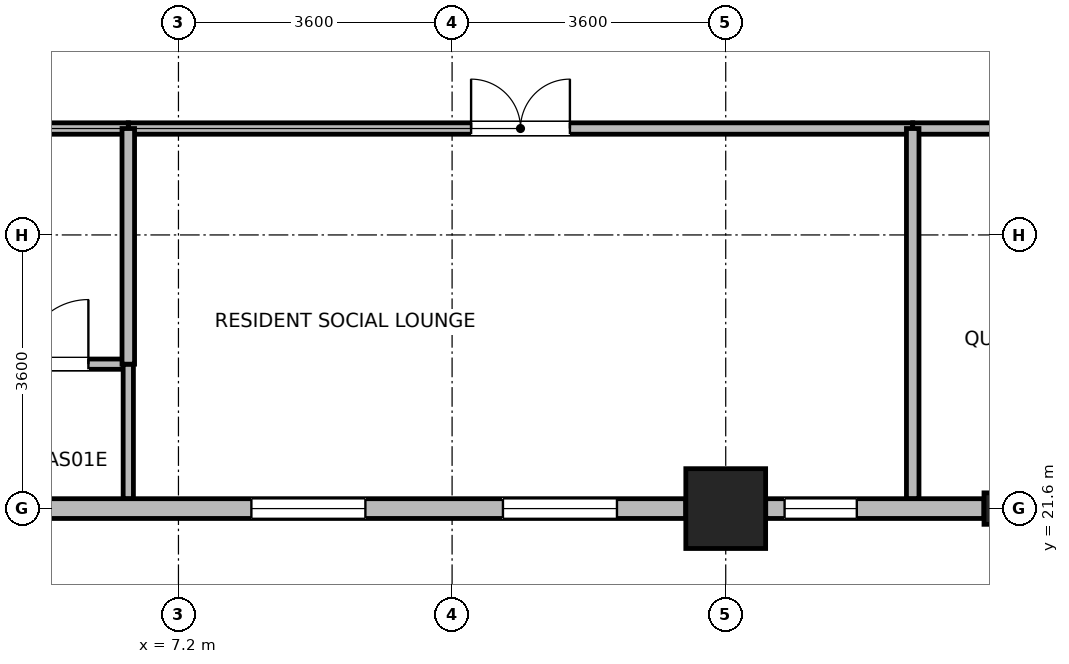
"""IFC4 building model, lengths in metres.
Left out: names, types, materials, properties, quantities, classifications, styles, units other than length and angle.
Written with IfcOpenShell. Run it as: python <this file> out.ifc"""

import sys

from ifc_helpers import new_model, si_unit, direction, frame, frame_2d, origin, origin_2d, place, context, subcontext, project, spatial, rectangle, i_section, extrude, source, transform, mapped, element, fill, save


model = new_model("IFC4")
c1 = context("Model", 3, precision=1e-05, world=origin(), true_north=direction((0.0, 1.0)))
c2 = subcontext(c1, "Body", "Model", "MODEL_VIEW")
j1 = project(units=[si_unit("LENGTHUNIT", "METRE"), si_unit("PLANEANGLEUNIT", "RADIAN")], contexts=[c1])
p1 = place(None, origin())
s1 = spatial("IfcSite", under=j1, at=p1, CompositionType="ELEMENT")
p2 = place(p1, origin())
s2 = spatial("IfcBuilding", under=s1, at=p2, CompositionType="ELEMENT")
p3 = place(p2, frame((0.0, 0.0, 177.2)))
s3 = spatial("IfcBuildingStorey", under=s2, at=p3, CompositionType="ELEMENT", Elevation=177.2)
m1 = source(origin(), c2, "Body", "SweptSolid", [
    extrude(rectangle(XDim=1.05, YDim=1.05, at=origin_2d()), origin(), (0.0, 0.0, 1.0), 3.7),
])
p4 = place(p3, frame((14.4, 21.6, 0.0), z_axis=(0.0, 0.0, 1.0), x_axis=(1.0, 0.0, 0.0)))
e1 = element("IfcColumn", 1, at=p4, inside=s3, PredefinedType="COLUMN", context=c2, shape_type="MappedRepresentation", body=[
    mapped(m1, transform((0.0, 0.0, 0.0), x_axis=(1.0, 0.0, 0.0), y_axis=(0.0, 1.0, 0.0), z_axis=(0.0, 0.0, 1.0), scale=1.0)),
])
m2 = source(origin(), c2, "Body", "SweptSolid", [
    extrude(i_section(OverallWidth=0.404, OverallDepth=0.414, WebThickness=0.021, FlangeThickness=0.028, FilletRadius=0.015, at=origin_2d()), origin(), (0.0, 0.0, 1.0), 3.7),
])
p5 = place(p3, frame((18.0, 21.6, 0.0), z_axis=(0.0, 0.0, 1.0), x_axis=(1.0, 0.0, 0.0)))
e2 = element("IfcColumn", 2, at=p5, inside=s3, PredefinedType="COLUMN", context=c2, shape_type="MappedRepresentation", body=[
    mapped(m2, transform((0.0, 0.0, 0.0), x_axis=(1.0, 0.0, 0.0), y_axis=(0.0, 1.0, 0.0), z_axis=(0.0, 0.0, 1.0), scale=1.0)),
])
p6 = place(p3, frame((13.874, 21.6, 0.0), z_axis=(0.0, 0.0, 1.0), x_axis=(-1.0, 0.0, 0.0)))
e3 = element("IfcWall", 3, at=p6, inside=s3, PredefinedType="STANDARD", context=c2, shape_type="SweptSolid", body=[
    extrude(rectangle(XDim=13.239, YDim=0.26, at=frame_2d((6.62, 0.0))), origin(), (0.0, 0.0, 1.0), 3.44),
])
p7 = place(p6, frame((0.905, 0.0, 0.85)))
e4 = element("IfcOpeningElement", 4, at=p7, cuts=e3, PredefinedType="OPENING", context=c2, shape_type="SweptSolid", body=[
    extrude(rectangle(XDim=1.5, YDim=1.85, at=frame_2d((0.75, 0.925))), frame((0.0, 0.14, 0.0), z_axis=(0.0, -1.0, 0.0), x_axis=(1.0, 0.0, 0.0)), (0.0, 0.0, 1.0), 0.28),
])
p8 = place(p6, frame((4.215, 0.0, 0.85)))
e5 = element("IfcOpeningElement", 5, at=p8, cuts=e3, PredefinedType="OPENING", context=c2, shape_type="SweptSolid", body=[
    extrude(rectangle(XDim=1.5, YDim=1.85, at=frame_2d((0.75, 0.925))), frame((0.0, 0.14, 0.0), z_axis=(0.0, -1.0, 0.0), x_axis=(1.0, 0.0, 0.0)), (0.0, 0.0, 1.0), 0.28),
])
p9 = place(p6, frame((10.834, 0.0, 0.85)))
e6 = element("IfcOpeningElement", 6, at=p9, cuts=e3, PredefinedType="OPENING", context=c2, shape_type="SweptSolid", body=[
    extrude(rectangle(XDim=1.5, YDim=1.85, at=frame_2d((0.75, 0.925))), frame((0.0, 0.14, 0.0), z_axis=(0.0, -1.0, 0.0), x_axis=(1.0, 0.0, 0.0)), (0.0, 0.0, 1.0), 0.28),
])
p10 = place(p3, frame((17.797, 21.6, 0.0), z_axis=(0.0, 0.0, 1.0), x_axis=(-1.0, 0.0, 0.0)))
e7 = element("IfcWall", 7, at=p10, inside=s3, PredefinedType="STANDARD", context=c2, shape_type="SweptSolid", body=[
    extrude(rectangle(XDim=2.871, YDim=0.26, at=frame_2d((1.436, 0.0))), origin(), (0.0, 0.0, 1.0), 2.99),
])
p11 = place(p10, frame((1.673, 0.0, 0.85)))
e8 = element("IfcOpeningElement", 8, at=p11, cuts=e7, PredefinedType="OPENING", context=c2, shape_type="SweptSolid", body=[
    extrude(rectangle(XDim=0.95, YDim=1.75, at=frame_2d((0.475, 0.875))), frame((0.0, 0.14, 0.0), z_axis=(0.0, -1.0, 0.0), x_axis=(1.0, 0.0, 0.0)), (0.0, 0.0, 1.0), 0.28),
])
p12 = place(p3, frame((4.64, 23.5, 0.0), z_axis=(0.0, 0.0, 1.0), x_axis=(1.0, 0.0, 0.0)))
e9 = element("IfcWall", 9, at=p12, inside=s3, PredefinedType="PARTITIONING", context=c2, shape_type="SweptSolid", body=[
    extrude(rectangle(XDim=1.9, YDim=0.135, at=frame_2d((0.95, 0.0))), origin(), (0.0, 0.0, 1.0), 3.44),
])
p13 = place(p12, frame((0.525, 0.0, 0.0)))
e10 = element("IfcOpeningElement", 10, at=p13, cuts=e9, PredefinedType="OPENING", context=c2, shape_type="SweptSolid", body=[
    extrude(rectangle(XDim=0.85, YDim=2.04, at=frame_2d((0.425, 1.02))), frame((0.0, 0.078, 0.0), z_axis=(0.0, -1.0, 0.0), x_axis=(1.0, 0.0, 0.0)), (0.0, 0.0, 1.0), 0.155),
])
p14 = place(p3, frame((6.54, 21.732, 0.0), z_axis=(0.0, 0.0, 1.0), x_axis=(0.0, 1.0, 0.0)))
e11 = element("IfcWall", 11, at=p14, inside=s3, PredefinedType="PARTITIONING", context=c2, shape_type="SweptSolid", body=[
    extrude(rectangle(XDim=1.768, YDim=0.135, at=frame_2d((0.884, 0.0))), origin(), (0.0, 0.0, 1.0), 3.44),
])
p15 = place(p3, frame((6.54, 26.6, 0.0), z_axis=(0.0, 0.0, 1.0), x_axis=(1.0, 0.0, 0.0)))
e12 = element("IfcWall", 12, at=p15, inside=s3, PredefinedType="PARTITIONING", context=c2, shape_type="SweptSolid", body=[
    extrude(rectangle(XDim=10.32, YDim=0.15, at=frame_2d((5.16, 0.0))), origin(), (0.0, 0.0, 1.0), 3.44),
])
p16 = place(p15, frame((4.51, 0.0, 0.0)))
e13 = element("IfcOpeningElement", 13, at=p16, cuts=e12, PredefinedType="OPENING", context=c2, shape_type="SweptSolid", body=[
    extrude(rectangle(XDim=1.3, YDim=2.12, at=frame_2d((0.65, 1.06))), frame((0.0, 0.085, 0.0), z_axis=(0.0, -1.0, 0.0), x_axis=(1.0, 0.0, 0.0)), (0.0, 0.0, 1.0), 0.17),
])
p17 = place(p3, frame((0.632, 26.6, 0.0), z_axis=(0.0, 0.0, 1.0), x_axis=(1.0, 0.0, 0.0)))
e14 = element("IfcWall", 14, at=p17, inside=s3, PredefinedType="PARTITIONING", context=c2, shape_type="SweptSolid", body=[
    extrude(rectangle(XDim=5.908, YDim=0.15, at=frame_2d((2.954, 0.0))), origin(), (0.0, 0.0, 1.0), 3.44),
])
p18 = place(p17, frame((2.479, 0.0, 0.0)))
e15 = element("IfcOpeningElement", 15, at=p18, cuts=e14, PredefinedType="OPENING", context=c2, shape_type="SweptSolid", body=[
    extrude(rectangle(XDim=0.95, YDim=2.1, at=frame_2d((0.475, 1.05))), frame((0.0, 0.085, 0.0), z_axis=(0.0, -1.0, 0.0), x_axis=(1.0, 0.0, 0.0)), (0.0, 0.0, 1.0), 0.17),
])
p19 = place(p3, frame((16.86, 26.6, 0.0), z_axis=(0.0, 0.0, 1.0), x_axis=(1.0, 0.0, 0.0)))
e16 = element("IfcWall", 16, at=p19, inside=s3, PredefinedType="PARTITIONING", context=c2, shape_type="SweptSolid", body=[
    extrude(rectangle(XDim=5.8, YDim=0.15, at=frame_2d((2.9, 0.0))), origin(), (0.0, 0.0, 1.0), 3.44),
])
p20 = place(p19, frame((2.25, 0.0, 0.0)))
e17 = element("IfcOpeningElement", 17, at=p20, cuts=e16, PredefinedType="OPENING", context=c2, shape_type="SweptSolid", body=[
    extrude(rectangle(XDim=1.3, YDim=2.12, at=frame_2d((0.65, 1.06))), frame((0.0, 0.085, 0.0), z_axis=(0.0, -1.0, 0.0), x_axis=(1.0, 0.0, 0.0)), (0.0, 0.0, 1.0), 0.17),
])
p21 = place(p3, frame((16.86, 21.732, 0.0), z_axis=(0.0, 0.0, 1.0), x_axis=(0.0, 1.0, 0.0)))
e18 = element("IfcWall", 18, at=p21, inside=s3, PredefinedType="PARTITIONING", context=c2, shape_type="SweptSolid", body=[
    extrude(rectangle(XDim=4.868, YDim=0.165, at=frame_2d((2.434, 0.0))), origin(), (0.0, 0.0, 1.0), 3.44),
])
p22 = place(p3, frame((6.54, 23.5, 0.0), z_axis=(0.0, 0.0, 1.0), x_axis=(0.0, 1.0, 0.0)))
e19 = element("IfcWall", 19, at=p22, inside=s3, PredefinedType="PARTITIONING", context=c2, shape_type="SweptSolid", body=[
    extrude(rectangle(XDim=3.1, YDim=0.165, at=frame_2d((1.55, 0.0))), origin(), (0.0, 0.0, 1.0), 3.44),
])
p23 = place(p7, origin())
e20 = element("IfcWindow", 20, at=p23, inside=s3, PartitioningType="SINGLE_PANEL", PredefinedType="WINDOW", context=c2, shape_type="SweptSolid", body=[
    extrude(rectangle(XDim=1.5, YDim=1.85, at=frame_2d((0.75, 0.925))), frame((0.0, 0.03, 0.0), z_axis=(0.0, -1.0, 0.0), x_axis=(1.0, 0.0, 0.0)), (0.0, 0.0, 1.0), 0.06),
])
fill(e4, e20)
p24 = place(p8, origin())
e21 = element("IfcWindow", 21, at=p24, inside=s3, PartitioningType="SINGLE_PANEL", PredefinedType="WINDOW", context=c2, shape_type="SweptSolid", body=[
    extrude(rectangle(XDim=1.5, YDim=1.85, at=frame_2d((0.75, 0.925))), frame((0.0, 0.03, 0.0), z_axis=(0.0, -1.0, 0.0), x_axis=(1.0, 0.0, 0.0)), (0.0, 0.0, 1.0), 0.06),
])
fill(e5, e21)
p25 = place(p11, origin())
e22 = element("IfcWindow", 22, at=p25, inside=s3, PartitioningType="SINGLE_PANEL", PredefinedType="WINDOW", context=c2, shape_type="SweptSolid", body=[
    extrude(rectangle(XDim=0.95, YDim=1.75, at=frame_2d((0.475, 0.875))), frame((0.0, 0.03, 0.0), z_axis=(0.0, -1.0, 0.0), x_axis=(1.0, 0.0, 0.0)), (0.0, 0.0, 1.0), 0.06),
])
fill(e8, e22)
p26 = place(p13, origin())
e23 = element("IfcDoor", 23, at=p26, inside=s3, OperationType="SINGLE_SWING_RIGHT", PredefinedType="DOOR", context=c2, shape_type="SweptSolid", body=[
    extrude(rectangle(XDim=0.85, YDim=2.04, at=frame_2d((0.425, 1.02))), frame((0.0, 0.025, 0.0), z_axis=(0.0, -1.0, 0.0), x_axis=(1.0, 0.0, 0.0)), (0.0, 0.0, 1.0), 0.05),
])
fill(e10, e23)
p27 = place(p16, origin())
e24 = element("IfcDoor", 24, at=p27, inside=s3, OperationType="DOUBLE_DOOR_SINGLE_SWING", PredefinedType="DOOR", context=c2, shape_type="SweptSolid", body=[
    extrude(rectangle(XDim=1.3, YDim=2.12, at=frame_2d((0.65, 1.06))), frame((0.0, 0.025, 0.0), z_axis=(0.0, -1.0, 0.0), x_axis=(1.0, 0.0, 0.0)), (0.0, 0.0, 1.0), 0.05),
])
fill(e13, e24)
save(model, sys.argv[1])
